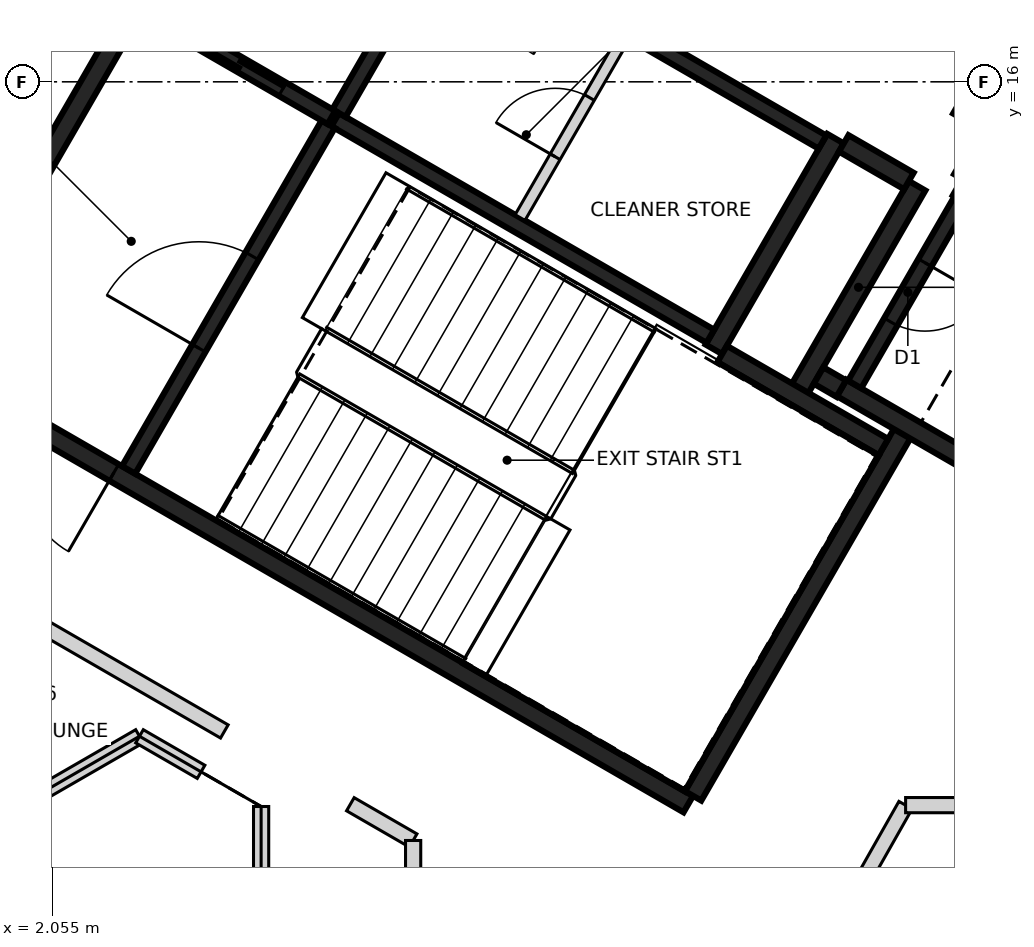
"""IFC4 building model, lengths in metres.
Left out: names, types, materials, properties, quantities, classifications, styles, units other than length and angle.
Written with IfcOpenShell. Run it as: python <this file> out.ifc"""

import sys

from ifc_helpers import new_model, si_unit, direction, frame, frame_2d, origin, place, context, subcontext, project, spatial, rectangle, extrude, element, fill, save


model = new_model("IFC4")
c1 = context("Model", 3, precision=1e-05, world=origin(), true_north=direction((0.0, 1.0)))
c2 = subcontext(c1, "Body", "Model", "MODEL_VIEW")
j1 = project(units=[si_unit("LENGTHUNIT", "METRE"), si_unit("PLANEANGLEUNIT", "RADIAN")], contexts=[c1])
p1 = place(None, origin())
s1 = spatial("IfcSite", under=j1, at=p1, CompositionType="ELEMENT")
p2 = place(p1, origin())
s2 = spatial("IfcBuilding", under=s1, at=p2, CompositionType="ELEMENT")
p3 = place(p2, frame((0.0, 0.0, 128.8)))
s3 = spatial("IfcBuildingStorey", under=s2, at=p3, CompositionType="ELEMENT", Elevation=128.8)
p4 = place(p3, frame((10.42, 6.498, 0.0), z_axis=(0.0, 0.0, 1.0), x_axis=(-0.866021906294, 0.500006057782, 0.0)))
e1 = element("IfcWall", 1, at=p4, inside=s3, PredefinedType="SHEAR", context=c2, shape_type="SweptSolid", body=[
    extrude(rectangle(XDim=11.55, YDim=0.25, at=frame_2d((5.775, 0.0))), origin(), (0.0, 0.0, 1.0), 3.2),
])
p5 = place(p4, frame((10.025, 0.0, 0.0)))
e2 = element("IfcOpeningElement", 2, at=p5, cuts=e1, PredefinedType="OPENING", context=c2, shape_type="SweptSolid", body=[
    extrude(rectangle(XDim=1.2, YDim=2.1, at=frame_2d((0.6, 1.05))), frame((0.0, 0.135, 0.0), z_axis=(0.0, -1.0, 0.0), x_axis=(1.0, 0.0, 0.0)), (0.0, 0.0, 1.0), 0.27),
])
p6 = place(p4, frame((8.725, 0.0, 0.0)))
e3 = element("IfcOpeningElement", 3, at=p6, cuts=e1, PredefinedType="OPENING", context=c2, shape_type="SweptSolid", body=[
    extrude(rectangle(XDim=1.2, YDim=2.1, at=frame_2d((0.6, 1.05))), frame((0.0, 0.135, 0.0), z_axis=(0.0, -1.0, 0.0), x_axis=(1.0, 0.0, 0.0)), (0.0, 0.0, 1.0), 0.27),
])
p7 = place(p3, frame((0.48, 12.381, 0.0), z_axis=(0.0, 0.0, 1.0), x_axis=(0.49999885962, 0.866026062182, 0.0)))
e4 = element("IfcWall", 4, at=p7, inside=s3, PredefinedType="SHEAR", context=c2, shape_type="SweptSolid", body=[
    extrude(rectangle(XDim=5.225, YDim=0.25, at=frame_2d((2.612, 0.0))), origin(), (0.0, 0.0, 1.0), 3.2),
])
p8 = place(p3, frame((13.238, 11.378, 0.0), z_axis=(0.0, 0.0, 1.0), x_axis=(-0.500008851346, -0.866020293397, 0.0)))
e5 = element("IfcWall", 5, at=p8, inside=s3, PredefinedType="SHEAR", context=c2, shape_type="SweptSolid", body=[
    extrude(rectangle(XDim=5.51, YDim=0.25, at=frame_2d((2.755, 0.0))), origin(), (0.0, 0.0, 1.0), 3.2),
])
p9 = place(p3, frame((12.357, 15.252, 0.0), z_axis=(0.0, 0.0, 1.0), x_axis=(-0.500028443584, -0.866008981251, 0.0)))
e6 = element("IfcWall", 6, at=p9, inside=s3, PredefinedType="SHEAR", context=c2, shape_type="SweptSolid", body=[
    extrude(rectangle(XDim=3.2, YDim=0.25, at=frame_2d((1.6, 0.0))), origin(), (0.0, 0.0, 1.0), 3.2),
])
p10 = place(p3, frame((14.918, 10.54, 0.0), z_axis=(0.0, 0.0, 1.0), x_axis=(-0.866063538972, 0.499933942099, 0.0)))
e7 = element("IfcWall", 7, at=p10, inside=s3, PredefinedType="SHEAR", context=c2, shape_type="SweptSolid", body=[
    extrude(rectangle(XDim=2.865, YDim=0.25, at=frame_2d((1.432, 0.0))), origin(), (0.0, 0.0, 1.0), 3.2),
])
p11 = place(p3, frame((13.963, 14.614, 0.0), z_axis=(0.0, 0.0, 1.0), x_axis=(0.866042235819, -0.499970844928, 0.0)))
e8 = element("IfcWall", 8, at=p11, inside=s3, PredefinedType="SHEAR", context=c2, shape_type="SweptSolid", body=[
    extrude(rectangle(XDim=2.865, YDim=0.25, at=frame_2d((1.432, 0.0))), origin(), (0.0, 0.0, 1.0), 3.2),
])
p12 = place(p3, frame((11.888, 11.961, 0.0), z_axis=(0.0, 0.0, 1.0), x_axis=(0.500003324108, 0.866023484601, 0.0)))
e9 = element("IfcWall", 9, at=p12, inside=s3, PredefinedType="SHEAR", context=c2, shape_type="SweptSolid", body=[
    extrude(rectangle(XDim=3.085, YDim=0.25, at=frame_2d((1.542, 0.0))), origin(), (0.0, 0.0, 1.0), 3.2),
])
p13 = place(p3, frame((10.865, 12.418, 0.0), z_axis=(0.0, 0.0, 1.0), x_axis=(0.866026229868, -0.499998569178, 0.0)))
e10 = element("IfcWall", 10, at=p13, inside=s3, PredefinedType="SHEAR", context=c2, shape_type="SweptSolid", body=[
    extrude(rectangle(XDim=2.449, YDim=0.25, at=frame_2d((1.225, 0.0))), origin(), (0.0, 0.0, 1.0), 3.2),
])
p14 = place(p3, frame((14.945, 17.135, 0.0), z_axis=(0.0, 0.0, 1.0), x_axis=(-0.499983108224, -0.866035156036, 0.0)))
e11 = element("IfcWall", 11, at=p14, inside=s3, PredefinedType="SHEAR", context=c2, shape_type="SweptSolid", body=[
    extrude(rectangle(XDim=1.865, YDim=0.25, at=frame_2d((0.932, 0.0))), origin(), (0.0, 0.0, 1.0), 3.2),
])
p15 = place(p14, frame((0.535, 0.0, 0.0)))
e12 = element("IfcOpeningElement", 12, at=p15, cuts=e11, PredefinedType="OPENING", context=c2, shape_type="SweptSolid", body=[
    extrude(rectangle(XDim=1.25, YDim=2.1, at=frame_2d((0.625, 1.05))), frame((0.0, 0.135, 0.0), z_axis=(0.0, -1.0, 0.0), x_axis=(1.0, 0.0, 0.0)), (0.0, 0.0, 1.0), 0.27),
])
p16 = place(p3, frame((13.322, 14.695, 0.0), z_axis=(0.0, 0.0, 1.0), x_axis=(-0.866017078145, 0.500014420154, 0.0)))
e13 = element("IfcWall", 13, at=p16, inside=s3, PredefinedType="SHEAR", context=c2, shape_type="SweptSolid", body=[
    extrude(rectangle(XDim=0.989, YDim=0.25, at=frame_2d((0.495, 0.0))), origin(), (0.0, 0.0, 1.0), 3.2),
])
p17 = place(p3, frame((14.368, 15.315, 0.0), z_axis=(0.0, 0.0, 1.0), x_axis=(-0.499897359611, -0.866084655132, 0.0)))
e14 = element("IfcWall", 14, at=p17, inside=s3, PredefinedType="SHEAR", context=c2, shape_type="SweptSolid", body=[
    extrude(rectangle(XDim=0.685, YDim=0.25, at=frame_2d((0.342, 0.0))), origin(), (0.0, 0.0, 1.0), 3.2),
])
p18 = place(p3, frame((12.433, 11.964, 0.0), z_axis=(0.0, 0.0, 1.0), x_axis=(-0.866055875208, 0.499947218231, 0.0)))
e15 = element("IfcWall", 15, at=p18, inside=s3, PredefinedType="SHEAR", context=c2, shape_type="SweptSolid", body=[
    extrude(rectangle(XDim=0.345, YDim=0.25, at=frame_2d((0.172, 0.0))), origin(), (0.0, 0.0, 1.0), 3.2),
])
p19 = place(p3, frame((5.775, 15.502, 0.0), z_axis=(0.0, 0.0, 1.0), x_axis=(0.866020080793, -0.500009219579, 0.0)))
e16 = element("IfcWall", 16, at=p19, inside=s3, PredefinedType="SHEAR", context=c2, shape_type="SweptSolid", body=[
    extrude(rectangle(XDim=5.699, YDim=0.2, at=frame_2d((2.85, 0.0))), origin(), (0.0, 0.0, 1.0), 3.2),
])
p20 = place(p3, frame((12.185, 15.207, 0.0), z_axis=(0.0, 0.0, 1.0), x_axis=(-0.866020080793, 0.500009219579, 0.0)))
e17 = element("IfcWall", 17, at=p20, inside=s3, PredefinedType="SHEAR", context=c2, shape_type="SweptSolid", body=[
    extrude(rectangle(XDim=5.699, YDim=0.2, at=frame_2d((2.85, 0.0))), origin(), (0.0, 0.0, 1.0), 3.2),
])
p21 = place(p20, frame((3.874, 0.0, 0.0)))
e18 = element("IfcOpeningElement", 18, at=p21, cuts=e17, PredefinedType="OPENING", context=c2, shape_type="SweptSolid", body=[
    extrude(rectangle(XDim=0.9, YDim=2.1, at=frame_2d((0.45, 1.05))), frame((0.0, 0.11, 0.0), z_axis=(0.0, -1.0, 0.0), x_axis=(1.0, 0.0, 0.0)), (0.0, 0.0, 1.0), 0.22),
])
p22 = place(p3, frame((3.057, 10.895, 0.0), z_axis=(0.0, 0.0, 1.0), x_axis=(0.499989418164, 0.866031513124, 0.0)))
e19 = element("IfcWall", 19, at=p22, inside=s3, PredefinedType="SHEAR", context=c2, shape_type="SweptSolid", body=[
    extrude(rectangle(XDim=5.251, YDim=0.2, at=frame_2d((2.625, 0.0))), origin(), (0.0, 0.0, 1.0), 3.2),
])
p23 = place(p22, frame((1.849, 0.0, 0.0)))
e20 = element("IfcOpeningElement", 20, at=p23, cuts=e19, PredefinedType="OPENING", context=c2, shape_type="SweptSolid", body=[
    extrude(rectangle(XDim=1.4, YDim=2.1, at=frame_2d((0.7, 1.05))), frame((0.0, 0.11, 0.0), z_axis=(0.0, -1.0, 0.0), x_axis=(1.0, 0.0, 0.0)), (0.0, 0.0, 1.0), 0.22),
])
p24 = place(p3, frame((14.008, 14.442, 0.0), z_axis=(0.0, 0.0, 1.0), x_axis=(-0.499986818241, -0.866033014143, 0.0)))
e21 = element("IfcWall", 21, at=p24, inside=s3, PredefinedType="SHEAR", context=c2, shape_type="SweptSolid", body=[
    extrude(rectangle(XDim=2.798, YDim=0.2, at=frame_2d((1.399, 0.0))), origin(), (0.0, 0.0, 1.0), 3.2),
])
p25 = place(p24, frame((0.949, 0.0, 0.0)))
e22 = element("IfcOpeningElement", 22, at=p25, cuts=e21, PredefinedType="OPENING", context=c2, shape_type="SweptSolid", body=[
    extrude(rectangle(XDim=0.9, YDim=2.1, at=frame_2d((0.45, 1.05))), frame((0.0, 0.11, 0.0), z_axis=(0.0, -1.0, 0.0), x_axis=(1.0, 0.0, 0.0)), (0.0, 0.0, 1.0), 0.22),
])
p26 = place(p3, frame((7.199, 17.97, 0.0), z_axis=(0.0, 0.0, 1.0), x_axis=(-0.499968400327, -0.866043647095, 0.0)))
e23 = element("IfcWall", 23, at=p26, inside=s3, PredefinedType="SHEAR", context=c2, shape_type="SweptSolid", body=[
    extrude(rectangle(XDim=2.75, YDim=0.2, at=frame_2d((1.375, 0.0))), origin(), (0.0, 0.0, 1.0), 3.2),
])
p27 = place(p3, frame((5.725, 15.531, 0.0), z_axis=(0.0, 0.0, 1.0), x_axis=(-0.866037306777, 0.499979382845, 0.0)))
e24 = element("IfcWall", 24, at=p27, inside=s3, PredefinedType="SHEAR", context=c2, shape_type="SweptSolid", body=[
    extrude(rectangle(XDim=2.742, YDim=0.2, at=frame_2d((1.371, 0.0))), origin(), (0.0, 0.0, 1.0), 3.2),
])
p28 = place(p27, frame((0.743, 0.0, 0.0)))
e25 = element("IfcOpeningElement", 25, at=p28, cuts=e24, PredefinedType="OPENING", context=c2, shape_type="SweptSolid", body=[
    extrude(rectangle(XDim=1.3, YDim=2.1, at=frame_2d((0.65, 1.05))), frame((0.0, 0.11, 0.0), z_axis=(0.0, -1.0, 0.0), x_axis=(1.0, 0.0, 0.0)), (0.0, 0.0, 1.0), 0.22),
])
p29 = place(p3, frame((8.207, 14.214, 0.0), z_axis=(0.0, 0.0, 1.0), x_axis=(0.499922376475, 0.866070215109, 0.0)))
e26 = element("IfcWall", 26, at=p29, inside=s3, PredefinedType="PARTITIONING", context=c2, shape_type="SweptSolid", body=[
    extrude(rectangle(XDim=2.749, YDim=0.15, at=frame_2d((1.374, 0.0))), origin(), (0.0, 0.0, 1.0), 3.2),
])
p30 = place(p29, frame((0.924, 0.0, 0.0)))
e27 = element("IfcOpeningElement", 27, at=p30, cuts=e26, PredefinedType="OPENING", context=c2, shape_type="SweptSolid", body=[
    extrude(rectangle(XDim=0.9, YDim=2.1, at=frame_2d((0.45, 1.05))), frame((0.0, 0.085, 0.0), z_axis=(0.0, -1.0, 0.0), x_axis=(1.0, 0.0, 0.0)), (0.0, 0.0, 1.0), 0.17),
])
p31 = place(p3, frame((1.813, 8.899, 0.0), z_axis=(0.0, 0.0, 1.0), x_axis=(0.865957732194, -0.50011719232, 0.0)))
e28 = element("IfcWall", 28, at=p31, inside=s3, PredefinedType="PARTITIONING", context=c2, shape_type="SweptSolid", body=[
    extrude(rectangle(XDim=2.891, YDim=0.2, at=frame_2d((1.445, 0.0))), origin(), (0.0, 0.0, 1.0), 2.3),
])
p32 = place(p3, frame((5.974, 6.496, 0.0), z_axis=(0.0, 0.0, 1.0), x_axis=(0.865934055563, -0.500158186394, 0.0)))
e29 = element("IfcWall", 29, at=p32, inside=s3, PredefinedType="PARTITIONING", context=c2, shape_type="SweptSolid", body=[
    extrude(rectangle(XDim=0.954, YDim=0.2, at=frame_2d((0.477, 0.0))), origin(), (0.0, 0.0, 1.0), 3.2),
])
p33 = place(p3, frame((6.8, -6.019, 0.0), z_axis=(0.0, 0.0, 1.0), x_axis=(0.0, 1.0, 0.0)))
e30 = element("IfcWall", 30, at=p33, inside=s3, PredefinedType="PARTITIONING", context=c2, shape_type="SweptSolid", body=[
    extrude(rectangle(XDim=12.038, YDim=0.2, at=frame_2d((6.019, 0.0))), origin(), (0.0, 0.0, 1.0), 3.2),
])
p34 = place(p33, frame((1.485, 0.0, 0.0)))
e31 = element("IfcOpeningElement", 31, at=p34, cuts=e30, PredefinedType="OPENING", context=c2, shape_type="SweptSolid", body=[
    extrude(rectangle(XDim=0.9, YDim=2.1, at=frame_2d((0.45, 1.05))), frame((0.0, 0.11, 0.0), z_axis=(0.0, -1.0, 0.0), x_axis=(1.0, 0.0, 0.0)), (0.0, 0.0, 1.0), 0.22),
])
p35 = place(p33, frame((7.492, 0.0, 0.0)))
e32 = element("IfcOpeningElement", 32, at=p35, cuts=e30, PredefinedType="OPENING", context=c2, shape_type="SweptSolid", body=[
    extrude(rectangle(XDim=0.9, YDim=2.1, at=frame_2d((0.45, 1.05))), frame((0.0, 0.11, 0.0), z_axis=(0.0, -1.0, 0.0), x_axis=(1.0, 0.0, 0.0)), (0.0, 0.0, 1.0), 0.22),
])
p36 = place(p3, frame((12.433, 4.992, 0.0), z_axis=(0.0, 0.0, 1.0), x_axis=(0.492807777065, 0.870138204462, 0.0)))
e33 = element("IfcWall", 33, at=p36, inside=s3, PredefinedType="PARTITIONING", context=c2, shape_type="SweptSolid", body=[
    extrude(rectangle(XDim=1.715, YDim=0.2, at=frame_2d((0.857, 0.0))), origin(), (0.0, 0.0, 1.0), 3.2),
])
p37 = place(p3, frame((13.279, 6.484, 0.0), z_axis=(0.0, 0.0, 1.0), x_axis=(1.0, 0.0, 0.0)))
e34 = element("IfcWall", 34, at=p37, inside=s3, PredefinedType="PARTITIONING", context=c2, shape_type="SweptSolid", body=[
    extrude(rectangle(XDim=2.943, YDim=0.2, at=frame_2d((1.471, 0.0))), origin(), (0.0, 0.0, 1.0), 3.2),
])
p38 = place(p37, frame((0.971, 0.0, 0.0)))
e35 = element("IfcOpeningElement", 35, at=p38, cuts=e34, PredefinedType="OPENING", context=c2, shape_type="SweptSolid", body=[
    extrude(rectangle(XDim=1.0, YDim=2.1, at=frame_2d((0.5, 1.05))), frame((0.0, 0.11, 0.0), z_axis=(0.0, -1.0, 0.0), x_axis=(1.0, 0.0, 0.0)), (0.0, 0.0, 1.0), 0.22),
])
p39 = place(p3, frame((-8.0, 0.924, 0.0), z_axis=(0.0, 0.0, 1.0), x_axis=(0.86604129137, 0.499972480886, 0.0)))
e36 = element("IfcWall", 36, at=p39, inside=s3, PredefinedType="PARTITIONING", context=c2, shape_type="SweptSolid", body=[
    extrude(rectangle(XDim=12.932, YDim=0.2, at=frame_2d((6.466, 0.0))), origin(), (0.0, 0.0, 1.0), 2.3),
])
p40 = place(p3, frame((3.2, 7.39, 0.0), z_axis=(0.0, 0.0, 1.0), x_axis=(0.865985641702, -0.500068863623, 0.0)))
e37 = element("IfcWall", 37, at=p40, inside=s3, PredefinedType="PARTITIONING", context=c2, shape_type="SweptSolid", body=[
    extrude(rectangle(XDim=0.935, YDim=0.2, at=frame_2d((0.468, 0.0))), origin(), (0.0, 0.0, 1.0), 2.3),
])
p41 = place(p3, frame((4.8, -6.466, 0.0), z_axis=(0.0, 0.0, 1.0), x_axis=(0.0, 1.0, 0.0)))
e38 = element("IfcWall", 38, at=p41, inside=s3, PredefinedType="PARTITIONING", context=c2, shape_type="SweptSolid", body=[
    extrude(rectangle(XDim=12.932, YDim=0.2, at=frame_2d((6.466, 0.0))), origin(), (0.0, 0.0, 1.0), 2.3),
])
p42 = place(p28, origin())
e39 = element("IfcDoor", 39, at=p42, inside=s3, OperationType="SLIDING_TO_LEFT", PredefinedType="DOOR", context=c2, shape_type="SweptSolid", body=[
    extrude(rectangle(XDim=1.3, YDim=2.1, at=frame_2d((0.65, 1.05))), frame((0.0, 0.025, 0.0), z_axis=(0.0, -1.0, 0.0), x_axis=(1.0, 0.0, 0.0)), (0.0, 0.0, 1.0), 0.05),
])
fill(e25, e39)
p43 = place(p6, origin())
e40 = element("IfcDoor", 40, at=p43, inside=s3, OperationType="SINGLE_SWING_RIGHT", PredefinedType="DOOR", context=c2, shape_type="SweptSolid", body=[
    extrude(rectangle(XDim=1.2, YDim=2.1, at=frame_2d((0.6, 1.05))), frame((0.0, 0.025, 0.0), z_axis=(0.0, -1.0, 0.0), x_axis=(1.0, 0.0, 0.0)), (0.0, 0.0, 1.0), 0.05),
])
fill(e3, e40)
p44 = place(p23, origin())
e41 = element("IfcDoor", 41, at=p44, inside=s3, OperationType="SINGLE_SWING_LEFT", PredefinedType="DOOR", context=c2, shape_type="SweptSolid", body=[
    extrude(rectangle(XDim=1.4, YDim=2.1, at=frame_2d((0.7, 1.05))), frame((0.0, 0.025, 0.0), z_axis=(0.0, -1.0, 0.0), x_axis=(1.0, 0.0, 0.0)), (0.0, 0.0, 1.0), 0.05),
])
fill(e20, e41)
p45 = place(p25, origin())
e42 = element("IfcDoor", 42, at=p45, inside=s3, OperationType="SINGLE_SWING_LEFT", PredefinedType="DOOR", context=c2, shape_type="SweptSolid", body=[
    extrude(rectangle(XDim=0.9, YDim=2.1, at=frame_2d((0.45, 1.05))), frame((0.0, 0.025, 0.0), z_axis=(0.0, -1.0, 0.0), x_axis=(1.0, 0.0, 0.0)), (0.0, 0.0, 1.0), 0.05),
])
fill(e22, e42)
p46 = place(p30, origin())
e43 = element("IfcDoor", 43, at=p46, inside=s3, OperationType="SINGLE_SWING_RIGHT", PredefinedType="DOOR", context=c2, shape_type="SweptSolid", body=[
    extrude(rectangle(XDim=0.9, YDim=2.1, at=frame_2d((0.45, 1.05))), frame((0.0, 0.025, 0.0), z_axis=(0.0, -1.0, 0.0), x_axis=(1.0, 0.0, 0.0)), (0.0, 0.0, 1.0), 0.05),
])
fill(e27, e43)
save(model, sys.argv[1])
